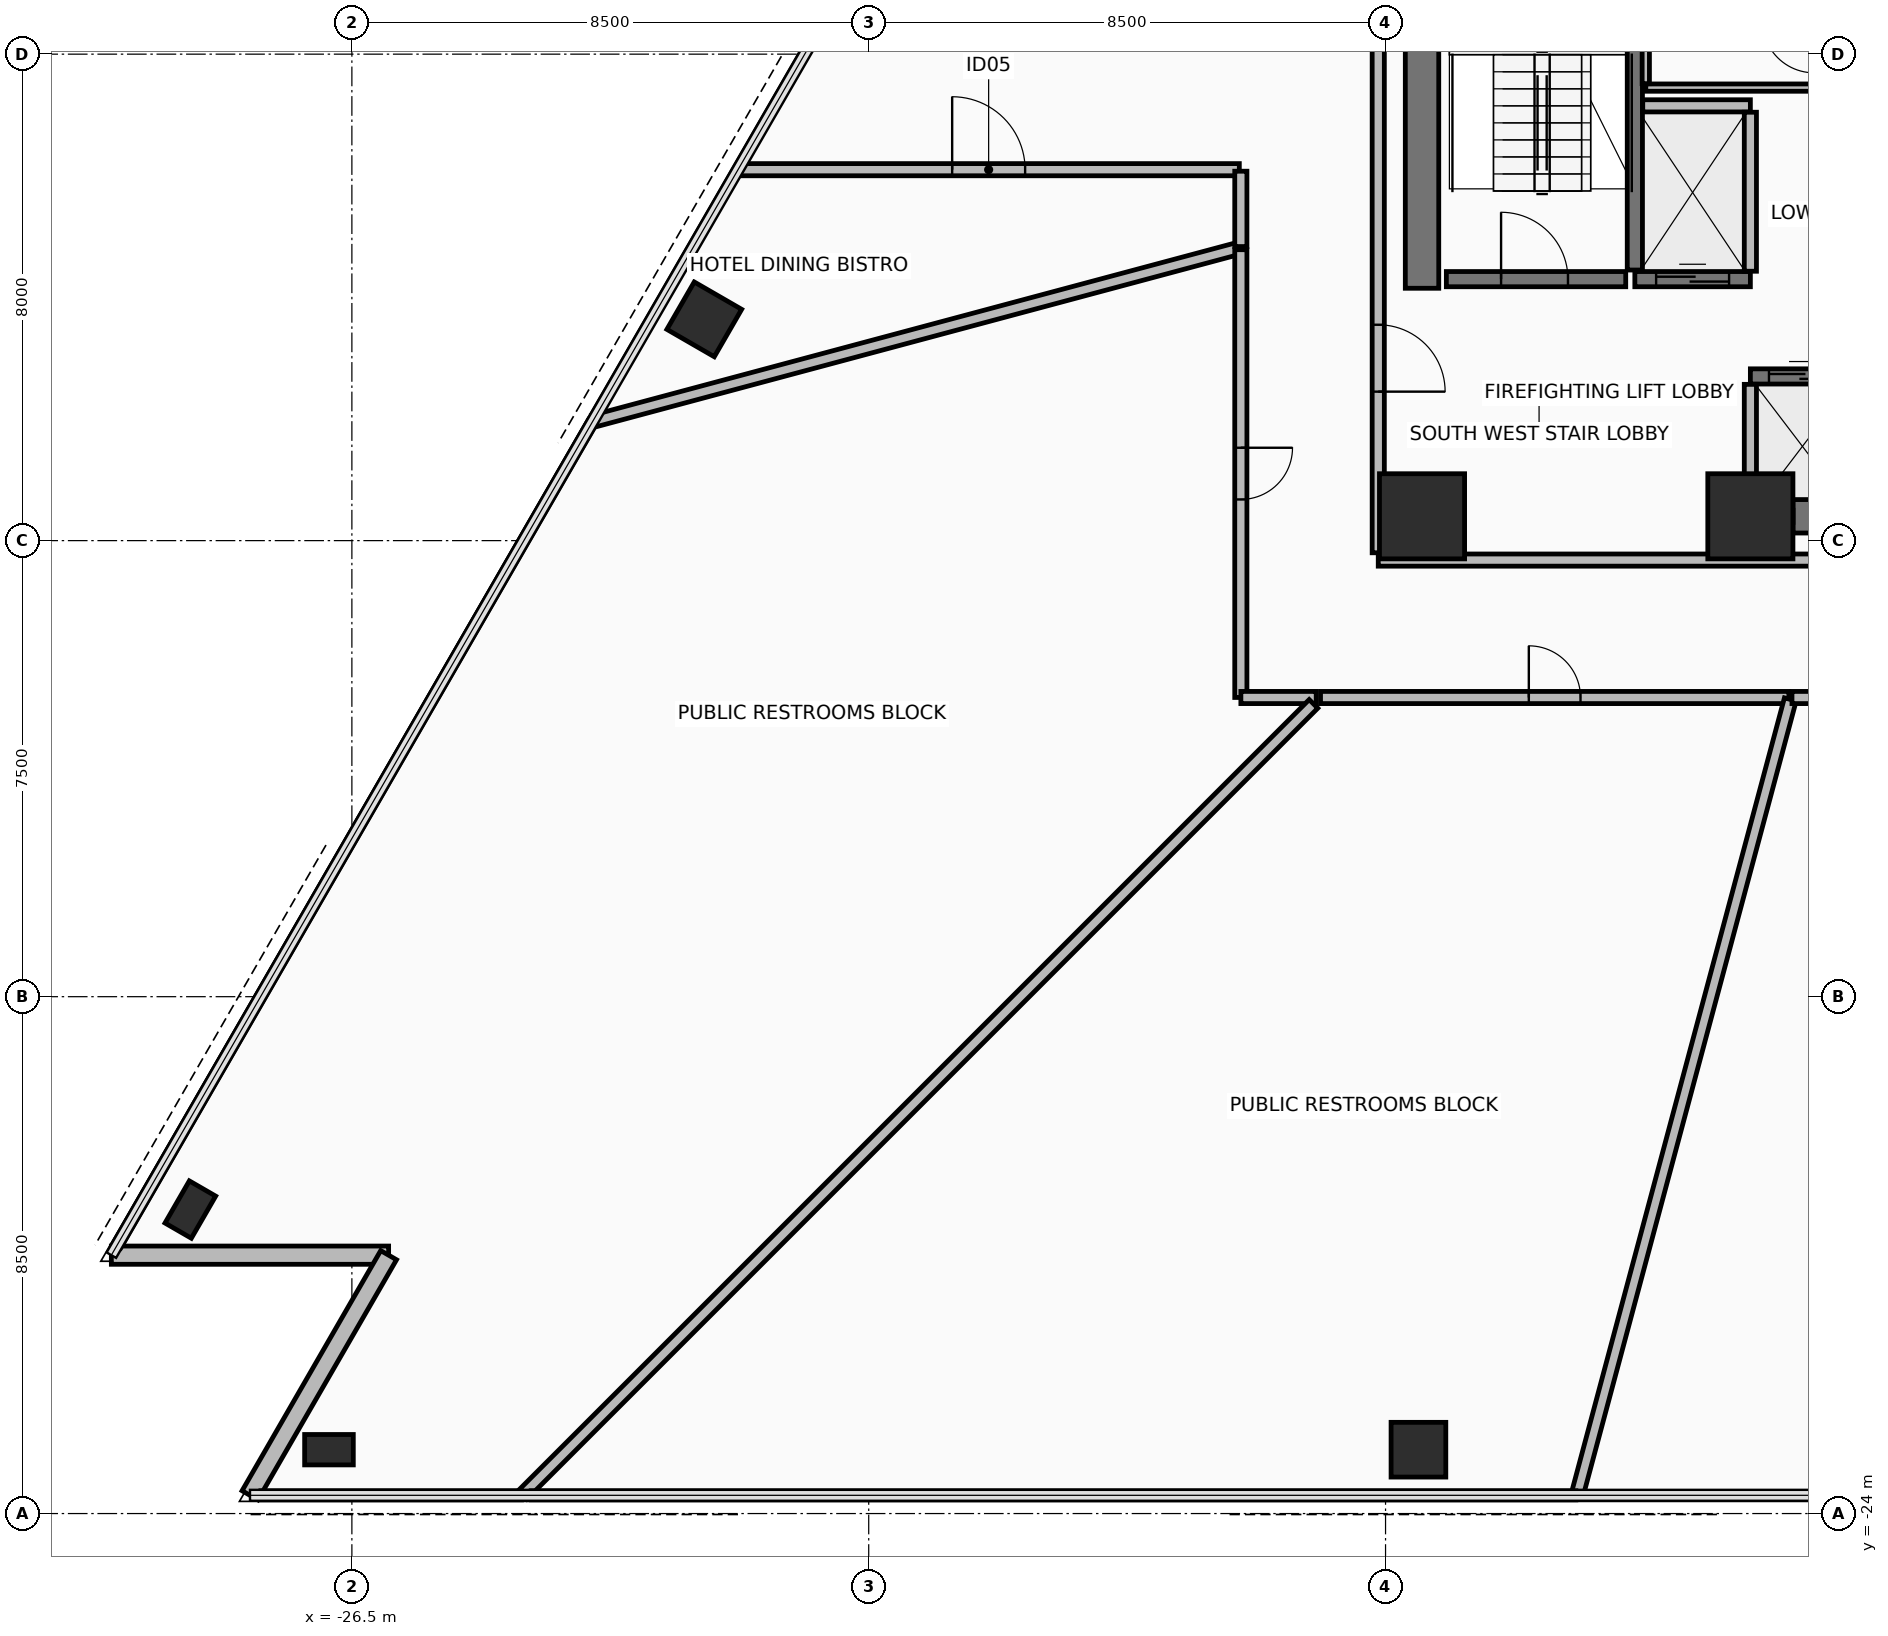
"""IFC4 building model, lengths in metres.
Left out: names, types, materials, properties, quantities, classifications, styles, units other than length and angle.
Written with IfcOpenShell. Run it as: python <this file> out.ifc"""

import sys

from ifc_helpers import new_model, si_unit, direction, frame, frame_2d, origin, origin_2d, place, context, subcontext, project, spatial, rectangle, hollow_rectangle, extrude, element, fill, save


model = new_model("IFC4")
c1 = context("Model", 3, precision=1e-05, world=origin(), true_north=direction((0.0, 1.0)))
c2 = subcontext(c1, "Body", "Model", "MODEL_VIEW")
j1 = project(units=[si_unit("LENGTHUNIT", "METRE"), si_unit("PLANEANGLEUNIT", "RADIAN")], contexts=[c1])
p1 = place(None, origin())
s1 = spatial("IfcSite", under=j1, at=p1, CompositionType="ELEMENT")
p2 = place(p1, origin())
s2 = spatial("IfcBuilding", under=s1, at=p2, CompositionType="ELEMENT")
p3 = place(p2, frame((0.0, 0.0, 48.85)))
s3 = spatial("IfcBuildingStorey", under=s2, at=p3, CompositionType="ELEMENT", Elevation=48.85)
for number, where, z_axis, x_axis in (
    (1, (-8.9, -7.6, 0.0), (0.0, 0.0, 1.0), (1.0, 0.0, 0.0)),
    (2, (-3.5, -7.6, 0.0), (0.0, 0.0, 1.0), (1.0, 0.0, 0.0)),
):
    element("IfcColumn", number, at=place(p3, frame(where, z_axis=z_axis, x_axis=x_axis)), inside=s3, PredefinedType="COLUMN", context=c2, shape_type="SweptSolid", body=[
        extrude(rectangle(XDim=1.4, YDim=1.4, at=origin_2d()), origin(), (0.0, 0.0, 1.0), 3.4),
    ])
p4 = place(p3, frame((-20.705, -4.361, 0.0), z_axis=(0.0, 0.0, 1.0), x_axis=(0.500001511499, 0.866024531118, 0.0)))
e3 = element("IfcColumn", 3, at=p4, inside=s3, PredefinedType="COLUMN", context=c2, shape_type="SweptSolid", body=[
    extrude(hollow_rectangle(XDim=0.9, YDim=0.9, WallThickness=0.05, at=origin_2d()), origin(), (0.0, 0.0, 1.0), 3.4),
])
for number, where, z_axis, x_axis in (
    (4, (-29.157, -19.001, 0.0), (0.0, 0.0, 1.0), (0.5, 0.866, 0.0)),
    (5, (-26.877, -22.95, 0.0), (0.0, 0.0, 1.0), (1.0, 0.0, 0.0)),
):
    element("IfcColumn", number, at=place(p3, frame(where, z_axis=z_axis, x_axis=x_axis)), inside=s3, PredefinedType="COLUMN", context=c2, shape_type="SweptSolid", body=[
        extrude(hollow_rectangle(XDim=0.5, YDim=0.8, WallThickness=0.04, at=origin_2d()), origin(), (0.0, 0.0, 1.0), 3.4),
    ])
p5 = place(p3, frame((-8.959, -22.95, 0.0), z_axis=(0.0, 0.0, 1.0), x_axis=(1.0, 0.0, 0.0)))
e6 = element("IfcColumn", 6, at=p5, inside=s3, PredefinedType="COLUMN", context=c2, shape_type="SweptSolid", body=[
    extrude(hollow_rectangle(XDim=0.9, YDim=0.9, WallThickness=0.05, at=origin_2d()), origin(), (0.0, 0.0, 1.0), 3.4),
])
p6 = place(p3, frame((-30.456, -19.751, 0.0), z_axis=(0.0, 0.0, 1.0), x_axis=(1.0, 0.0, 0.0)))
e7 = element("IfcWall", 7, at=p6, inside=s3, PredefinedType="STANDARD", context=c2, shape_type="SweptSolid", body=[
    extrude(rectangle(XDim=4.56, YDim=0.3, at=frame_2d((2.28, 0.0))), origin(), (0.0, 0.0, 1.0), 2.42),
])
p7 = place(p3, frame((-25.896, -19.751, 0.0), z_axis=(0.0, 0.0, 1.0), x_axis=(-0.500014431597, -0.866017071537, 0.0)))
e8 = element("IfcWall", 8, at=p7, inside=s3, PredefinedType="STANDARD", context=c2, shape_type="SweptSolid", body=[
    extrude(rectangle(XDim=4.56, YDim=0.3, at=frame_2d((2.28, 0.0))), origin(), (0.0, 0.0, 1.0), 2.42),
])
p8 = place(p3, frame((-2.8, -7.6, 0.0), z_axis=(0.0, 0.0, 1.0), x_axis=(1.0, 0.0, 0.0)))
e9 = element("IfcWall", 9, at=p8, inside=s3, PredefinedType="SHEAR", context=c2, shape_type="SweptSolid", body=[
    extrude(rectangle(XDim=5.38, YDim=0.55, at=frame_2d((2.69, 0.0))), origin(), (0.0, 0.0, 1.0), 3.225),
])
p9 = place(p3, frame((-8.9, -3.85, 0.0), z_axis=(0.0, 0.0, 1.0), x_axis=(0.0, 1.0, 0.0)))
e10 = element("IfcWall", 10, at=p9, inside=s3, PredefinedType="SHEAR", context=c2, shape_type="SweptSolid", body=[
    extrude(rectangle(XDim=10.7, YDim=0.55, at=frame_2d((5.35, 0.0))), origin(), (0.0, 0.0, 1.0), 3.225),
])
p10 = place(p3, frame((-9.62, -8.32, 0.0), z_axis=(0.0, 0.0, 1.0), x_axis=(1.0, 0.0, 0.0)))
e11 = element("IfcWall", 11, at=p10, inside=s3, PredefinedType="PARTITIONING", context=c2, shape_type="SweptSolid", body=[
    extrude(rectangle(XDim=19.24, YDim=0.2, at=frame_2d((9.62, 0.0))), origin(), (0.0, 0.0, 1.0), 2.62),
])
p11 = place(p10, frame((15.02, 0.0, 0.0)))
e12 = element("IfcOpeningElement", 12, at=p11, cuts=e11, PredefinedType="OPENING", context=c2, shape_type="SweptSolid", body=[
    extrude(rectangle(XDim=0.9, YDim=2.1, at=frame_2d((0.45, 1.05))), frame((0.0, 0.11, 0.0), z_axis=(0.0, -1.0, 0.0), x_axis=(1.0, 0.0, 0.0)), (0.0, 0.0, 1.0), 0.22),
])
p12 = place(p3, frame((-9.62, 8.2, 0.0), z_axis=(0.0, 0.0, 1.0), x_axis=(0.0, -1.0, 0.0)))
e13 = element("IfcWall", 13, at=p12, inside=s3, PredefinedType="PARTITIONING", context=c2, shape_type="SweptSolid", body=[
    extrude(rectangle(XDim=16.4, YDim=0.2, at=frame_2d((8.2, 0.0))), origin(), (0.0, 0.0, 1.0), 2.62),
])
p13 = place(p12, frame((12.65, 0.0, 0.0)))
e14 = element("IfcOpeningElement", 14, at=p13, cuts=e13, PredefinedType="OPENING", context=c2, shape_type="SweptSolid", body=[
    extrude(rectangle(XDim=1.1, YDim=2.15, at=frame_2d((0.55, 1.075))), frame((0.0, 0.11, 0.0), z_axis=(0.0, -1.0, 0.0), x_axis=(1.0, 0.0, 0.0)), (0.0, 0.0, 1.0), 0.22),
])
p14 = place(p3, frame((-5.4, -3.55, 0.0), z_axis=(0.0, 0.0, 1.0), x_axis=(0.0, 1.0, 0.0)))
e15 = element("IfcWall", 15, at=p14, inside=s3, PredefinedType="SHEAR", context=c2, shape_type="SweptSolid", body=[
    extrude(rectangle(XDim=7.3, YDim=0.25, at=frame_2d((3.65, 0.0))), origin(), (0.0, 0.0, 1.0), 3.225),
])
p15 = place(p3, frame((-8.5, -3.7, 0.0), z_axis=(0.0, 0.0, 1.0), x_axis=(1.0, 0.0, 0.0)))
e16 = element("IfcWall", 16, at=p15, inside=s3, PredefinedType="SHEAR", context=c2, shape_type="SweptSolid", body=[
    extrude(rectangle(XDim=2.95, YDim=0.25, at=frame_2d((1.475, 0.0))), origin(), (0.0, 0.0, 1.0), 3.225),
])
p16 = place(p15, frame((0.9, 0.0, 0.0)))
e17 = element("IfcOpeningElement", 17, at=p16, cuts=e16, PredefinedType="OPENING", context=c2, shape_type="SweptSolid", body=[
    extrude(rectangle(XDim=1.1, YDim=2.15, at=frame_2d((0.55, 1.075))), frame((0.0, 0.135, 0.0), z_axis=(0.0, -1.0, 0.0), x_axis=(1.0, 0.0, 0.0)), (0.0, 0.0, 1.0), 0.27),
])
p17 = place(p3, frame((-3.5, -5.3, 0.0), z_axis=(0.0, 0.0, 1.0), x_axis=(1.0, 0.0, 0.0)))
e18 = element("IfcWall", 18, at=p17, inside=s3, PredefinedType="SHEAR", context=c2, shape_type="SweptSolid", body=[
    extrude(rectangle(XDim=1.712, YDim=0.25, at=frame_2d((0.856, 0.0))), origin(), (0.0, 0.0, 1.0), 3.225),
])
p18 = place(p17, frame((0.306, 0.0, 0.0)))
e19 = element("IfcOpeningElement", 19, at=p18, cuts=e18, PredefinedType="OPENING", context=c2, shape_type="SweptSolid", body=[
    extrude(rectangle(XDim=1.1, YDim=2.2, at=frame_2d((0.55, 1.1))), frame((0.0, 0.135, 0.0), z_axis=(0.0, -1.0, 0.0), x_axis=(1.0, 0.0, 0.0)), (0.0, 0.0, 1.0), 0.27),
])
p19 = place(p3, frame((-3.5, -7.6, 0.0), z_axis=(0.0, 0.0, 1.0), x_axis=(1.0, 0.0, 0.0)))
e20 = element("IfcWall", 20, at=p19, inside=s3, PredefinedType="PARTITIONING", context=c2, shape_type="SweptSolid", body=[
    extrude(rectangle(XDim=0.7, YDim=0.2, at=frame_2d((0.35, 0.0))), origin(), (0.0, 0.0, 1.0), 2.42),
])
p20 = place(p3, frame((-3.5, -7.495, 0.0), z_axis=(0.0, 0.0, 1.0), x_axis=(0.0, 1.0, 0.0)))
e21 = element("IfcWall", 21, at=p20, inside=s3, PredefinedType="PARTITIONING", context=c2, shape_type="SweptSolid", body=[
    extrude(rectangle(XDim=2.065, YDim=0.2, at=frame_2d((1.033, 0.0))), origin(), (0.0, 0.0, 1.0), 2.42),
])
p21 = place(p3, frame((-5.4, -3.7, 0.0), z_axis=(0.0, 0.0, 1.0), x_axis=(1.0, 0.0, 0.0)))
e22 = element("IfcWall", 22, at=p21, inside=s3, PredefinedType="SHEAR", context=c2, shape_type="SweptSolid", body=[
    extrude(rectangle(XDim=1.9, YDim=0.25, at=frame_2d((0.95, 0.0))), origin(), (0.0, 0.0, 1.0), 3.225),
])
p22 = place(p21, frame((0.35, 0.0, 0.0)))
e23 = element("IfcOpeningElement", 23, at=p22, cuts=e22, PredefinedType="OPENING", context=c2, shape_type="SweptSolid", body=[
    extrude(rectangle(XDim=1.2, YDim=2.2, at=frame_2d((0.6, 1.1))), frame((0.0, 0.135, 0.0), z_axis=(0.0, -1.0, 0.0), x_axis=(1.0, 0.0, 0.0)), (0.0, 0.0, 1.0), 0.27),
])
p23 = place(p3, frame((-5.27, -0.85, 0.0), z_axis=(0.0, 0.0, 1.0), x_axis=(1.0, 0.0, 0.0)))
e24 = element("IfcWall", 24, at=p23, inside=s3, PredefinedType="PARTITIONING", context=c2, shape_type="SweptSolid", body=[
    extrude(rectangle(XDim=1.77, YDim=0.2, at=frame_2d((0.885, 0.0))), origin(), (0.0, 0.0, 1.0), 3.225),
])
p24 = place(p3, frame((-3.5, -3.57, 0.0), z_axis=(0.0, 0.0, 1.0), x_axis=(0.0, 1.0, 0.0)))
e25 = element("IfcWall", 25, at=p24, inside=s3, PredefinedType="PARTITIONING", context=c2, shape_type="SweptSolid", body=[
    extrude(rectangle(XDim=2.615, YDim=0.2, at=frame_2d((1.308, 0.0))), origin(), (0.0, 0.0, 1.0), 3.225),
])
p25 = place(p3, frame((-5.22, -0.55, 0.0), z_axis=(0.0, 0.0, 1.0), x_axis=(1.0, 0.0, 0.0)))
e26 = element("IfcWall", 26, at=p25, inside=s3, PredefinedType="PARTITIONING", context=c2, shape_type="SweptSolid", body=[
    extrude(rectangle(XDim=2.77, YDim=0.12, at=frame_2d((1.385, 0.0))), origin(), (0.0, 0.0, 1.0), 3.225),
])
p26 = place(p3, frame((-5.22, 0.655, 0.0), z_axis=(0.0, 0.0, 1.0), x_axis=(0.0, -1.0, 0.0)))
e27 = element("IfcWall", 27, at=p26, inside=s3, PredefinedType="PARTITIONING", context=c2, shape_type="SweptSolid", body=[
    extrude(rectangle(XDim=1.14, YDim=0.12, at=frame_2d((0.57, 0.0))), origin(), (0.0, 0.0, 1.0), 3.225),
])
p27 = place(p3, frame((-30.366, -19.596, 0.0), z_axis=(0.0, 0.0, 1.0), x_axis=(0.499991293932, 0.866030430177, 0.0)))
e28 = element("IfcWall", 28, at=p27, inside=s3, PredefinedType="PARTITIONING", context=c2, shape_type="SweptSolid", body=[
    extrude(rectangle(XDim=15.643, YDim=0.15, at=frame_2d((7.822, 0.0))), origin(), (0.0, 0.0, 1.0), 3.225),
])
p28 = place(p3, frame((-22.53, -6.037, 0.0), z_axis=(0.0, 0.0, 1.0), x_axis=(0.965922374415, 0.258831927328, 0.0)))
e29 = element("IfcWall", 29, at=p28, inside=s3, PredefinedType="PARTITIONING", context=c2, shape_type="SweptSolid", body=[
    extrude(rectangle(XDim=10.992, YDim=0.2, at=frame_2d((5.496, 0.0))), origin(), (0.0, 0.0, 1.0), 2.42),
])
p29 = place(p3, frame((-11.88, -3.216, 0.0), z_axis=(0.0, 0.0, 1.0), x_axis=(0.0, -1.0, 0.0)))
e30 = element("IfcWall", 30, at=p29, inside=s3, PredefinedType="PARTITIONING", context=c2, shape_type="SweptSolid", body=[
    extrude(rectangle(XDim=7.364, YDim=0.2, at=frame_2d((3.682, 0.0))), origin(), (0.0, 0.0, 1.0), 2.62),
])
p30 = place(p29, frame((3.257, 0.0, 0.0)))
e31 = element("IfcOpeningElement", 31, at=p30, cuts=e30, PredefinedType="OPENING", context=c2, shape_type="SweptSolid", body=[
    extrude(rectangle(XDim=0.85, YDim=2.1, at=frame_2d((0.425, 1.05))), frame((0.0, 0.11, 0.0), z_axis=(0.0, -1.0, 0.0), x_axis=(1.0, 0.0, 0.0)), (0.0, 0.0, 1.0), 0.22),
])
p31 = place(p3, frame((-11.879, -10.58, 0.0), z_axis=(0.0, 0.0, 1.0), x_axis=(1.0, 0.0, 0.0)))
e32 = element("IfcWall", 32, at=p31, inside=s3, PredefinedType="PARTITIONING", context=c2, shape_type="SweptSolid", body=[
    extrude(rectangle(XDim=1.239, YDim=0.2, at=frame_2d((0.62, 0.0))), origin(), (0.0, 0.0, 1.0), 3.225),
])
p32 = place(p3, frame((-10.685, -10.685, 0.0), z_axis=(0.0, 0.0, 1.0), x_axis=(-0.707106781187, -0.707106781187, 0.0)))
e33 = element("IfcWall", 33, at=p32, inside=s3, PredefinedType="PARTITIONING", context=c2, shape_type="SweptSolid", body=[
    extrude(rectangle(XDim=18.396, YDim=0.2, at=frame_2d((9.198, 0.0))), origin(), (0.0, 0.0, 1.0), 2.42),
])
p33 = place(p3, frame((-23.71, -23.7, 0.0), z_axis=(0.0, 0.0, 1.0), x_axis=(-1.0, 0.0, 0.0)))
e34 = element("IfcWall", 34, at=p33, inside=s3, PredefinedType="PARTITIONING", context=c2, shape_type="SweptSolid", body=[
    extrude(rectangle(XDim=4.286, YDim=0.15, at=frame_2d((2.143, 0.0))), origin(), (0.0, 0.0, 1.0), 3.225),
])
p34 = place(p3, frame((-10.57, -10.58, 0.0), z_axis=(0.0, 0.0, 1.0), x_axis=(1.0, 0.0, 0.0)))
e35 = element("IfcWall", 35, at=p34, inside=s3, PredefinedType="PARTITIONING", context=c2, shape_type="SweptSolid", body=[
    extrude(rectangle(XDim=7.702, YDim=0.2, at=frame_2d((3.851, 0.0))), origin(), (0.0, 0.0, 1.0), 2.62),
])
p35 = place(p34, frame((3.426, 0.0, 0.0)))
e36 = element("IfcOpeningElement", 36, at=p35, cuts=e35, PredefinedType="OPENING", context=c2, shape_type="SweptSolid", body=[
    extrude(rectangle(XDim=0.85, YDim=2.1, at=frame_2d((0.425, 1.05))), frame((0.0, 0.11, 0.0), z_axis=(0.0, -1.0, 0.0), x_axis=(1.0, 0.0, 0.0)), (0.0, 0.0, 1.0), 0.22),
])
p36 = place(p3, frame((-2.843, -10.612, 0.0), z_axis=(0.0, 0.0, 1.0), x_axis=(-0.25882927933, -0.965923083978, 0.0)))
e37 = element("IfcWall", 37, at=p36, inside=s3, PredefinedType="PARTITIONING", context=c2, shape_type="SweptSolid", body=[
    extrude(rectangle(XDim=13.531, YDim=0.2, at=frame_2d((6.766, 0.0))), origin(), (0.0, 0.0, 1.0), 2.42),
])
p37 = place(p3, frame((-6.37, -23.7, 0.0), z_axis=(0.0, 0.0, 1.0), x_axis=(-1.0, 0.0, 0.0)))
e38 = element("IfcWall", 38, at=p37, inside=s3, PredefinedType="PARTITIONING", context=c2, shape_type="SweptSolid", body=[
    extrude(rectangle(XDim=17.182, YDim=0.15, at=frame_2d((8.591, 0.0))), origin(), (0.0, 0.0, 1.0), 3.225),
])
p38 = place(p3, frame((-20.15, -1.9, 0.0), z_axis=(0.0, 0.0, 1.0), x_axis=(1.0, 0.0, 0.0)))
e39 = element("IfcWall", 39, at=p38, inside=s3, PredefinedType="PARTITIONING", context=c2, shape_type="SweptSolid", body=[
    extrude(rectangle(XDim=8.245, YDim=0.2, at=frame_2d((4.122, 0.0))), origin(), (0.0, 0.0, 1.0), 2.42),
])
p39 = place(p38, frame((3.522, 0.0, 0.0)))
e40 = element("IfcOpeningElement", 40, at=p39, cuts=e39, PredefinedType="OPENING", context=c2, shape_type="SweptSolid", body=[
    extrude(rectangle(XDim=1.2, YDim=2.15, at=frame_2d((0.6, 1.075))), frame((0.0, 0.11, 0.0), z_axis=(0.0, -1.0, 0.0), x_axis=(1.0, 0.0, 0.0)), (0.0, 0.0, 1.0), 0.22),
])
p40 = place(p3, frame((-11.88, -1.925, 0.0), z_axis=(0.0, 0.0, 1.0), x_axis=(0.0, -1.0, 0.0)))
e41 = element("IfcWall", 41, at=p40, inside=s3, PredefinedType="PARTITIONING", context=c2, shape_type="SweptSolid", body=[
    extrude(rectangle(XDim=1.239, YDim=0.2, at=frame_2d((0.62, 0.0))), origin(), (0.0, 0.0, 1.0), 3.225),
])
p41 = place(p3, frame((-2.816, -10.58, 0.0), z_axis=(0.0, 0.0, 1.0), x_axis=(1.0, 0.0, 0.0)))
e42 = element("IfcWall", 42, at=p41, inside=s3, PredefinedType="PARTITIONING", context=c2, shape_type="SweptSolid", body=[
    extrude(rectangle(XDim=5.631, YDim=0.2, at=frame_2d((2.816, 0.0))), origin(), (0.0, 0.0, 1.0), 3.225),
])
p42 = place(p41, frame((2.216, 0.0, 0.0)))
e43 = element("IfcOpeningElement", 43, at=p42, cuts=e42, PredefinedType="OPENING", context=c2, shape_type="SweptSolid", body=[
    extrude(rectangle(XDim=1.2, YDim=2.15, at=frame_2d((0.6, 1.075))), frame((0.0, 0.11, 0.0), z_axis=(0.0, -1.0, 0.0), x_axis=(1.0, 0.0, 0.0)), (0.0, 0.0, 1.0), 0.22),
])
p43 = place(p13, frame((1.1, 0.0, 0.0), z_axis=(0.0, 0.0, 1.0), x_axis=(-1.0, 0.0, 0.0)))
e44 = element("IfcDoor", 44, at=p43, inside=s3, OperationType="SINGLE_SWING_LEFT", PredefinedType="DOOR", context=c2, shape_type="SweptSolid", body=[
    extrude(rectangle(XDim=1.1, YDim=2.15, at=frame_2d((0.55, 1.075))), frame((0.0, 0.025, 0.0), z_axis=(0.0, -1.0, 0.0), x_axis=(1.0, 0.0, 0.0)), (0.0, 0.0, 1.0), 0.05),
])
fill(e14, e44)
p44 = place(p16, origin())
e45 = element("IfcDoor", 45, at=p44, inside=s3, OperationType="SINGLE_SWING_LEFT", PredefinedType="DOOR", context=c2, shape_type="SweptSolid", body=[
    extrude(rectangle(XDim=1.1, YDim=2.15, at=frame_2d((0.55, 1.075))), frame((0.0, 0.025, 0.0), z_axis=(0.0, -1.0, 0.0), x_axis=(1.0, 0.0, 0.0)), (0.0, 0.0, 1.0), 0.05),
])
fill(e17, e45)
p45 = place(p18, origin())
e46 = element("IfcDoor", 46, at=p45, inside=s3, OperationType="SLIDING_TO_LEFT", PredefinedType="DOOR", context=c2, shape_type="SweptSolid", body=[
    extrude(rectangle(XDim=1.1, YDim=2.2, at=frame_2d((0.55, 1.1))), frame((0.0, 0.025, 0.0), z_axis=(0.0, -1.0, 0.0), x_axis=(1.0, 0.0, 0.0)), (0.0, 0.0, 1.0), 0.05),
])
fill(e19, e46)
p46 = place(p22, origin())
e47 = element("IfcDoor", 47, at=p46, inside=s3, OperationType="SLIDING_TO_RIGHT", PredefinedType="DOOR", context=c2, shape_type="SweptSolid", body=[
    extrude(rectangle(XDim=1.2, YDim=2.2, at=frame_2d((0.6, 1.1))), frame((0.0, 0.025, 0.0), z_axis=(0.0, -1.0, 0.0), x_axis=(1.0, 0.0, 0.0)), (0.0, 0.0, 1.0), 0.05),
])
fill(e23, e47)
p47 = place(p30, origin())
e48 = element("IfcDoor", 48, at=p47, inside=s3, OperationType="SINGLE_SWING_RIGHT", PredefinedType="DOOR", context=c2, shape_type="SweptSolid", body=[
    extrude(rectangle(XDim=0.85, YDim=2.1, at=frame_2d((0.425, 1.05))), frame((0.0, 0.025, 0.0), z_axis=(0.0, -1.0, 0.0), x_axis=(1.0, 0.0, 0.0)), (0.0, 0.0, 1.0), 0.05),
])
fill(e31, e48)
p48 = place(p35, origin())
e49 = element("IfcDoor", 49, at=p48, inside=s3, OperationType="SINGLE_SWING_RIGHT", PredefinedType="DOOR", context=c2, shape_type="SweptSolid", body=[
    extrude(rectangle(XDim=0.85, YDim=2.1, at=frame_2d((0.425, 1.05))), frame((0.0, 0.025, 0.0), z_axis=(0.0, -1.0, 0.0), x_axis=(1.0, 0.0, 0.0)), (0.0, 0.0, 1.0), 0.05),
])
fill(e36, e49)
p49 = place(p39, origin())
e50 = element("IfcDoor", 50, at=p49, inside=s3, OperationType="SINGLE_SWING_LEFT", PredefinedType="DOOR", context=c2, shape_type="SweptSolid", body=[
    extrude(rectangle(XDim=1.2, YDim=2.15, at=frame_2d((0.6, 1.075))), frame((0.0, 0.025, 0.0), z_axis=(0.0, -1.0, 0.0), x_axis=(1.0, 0.0, 0.0)), (0.0, 0.0, 1.0), 0.05),
])
fill(e40, e50)
save(model, sys.argv[1])
